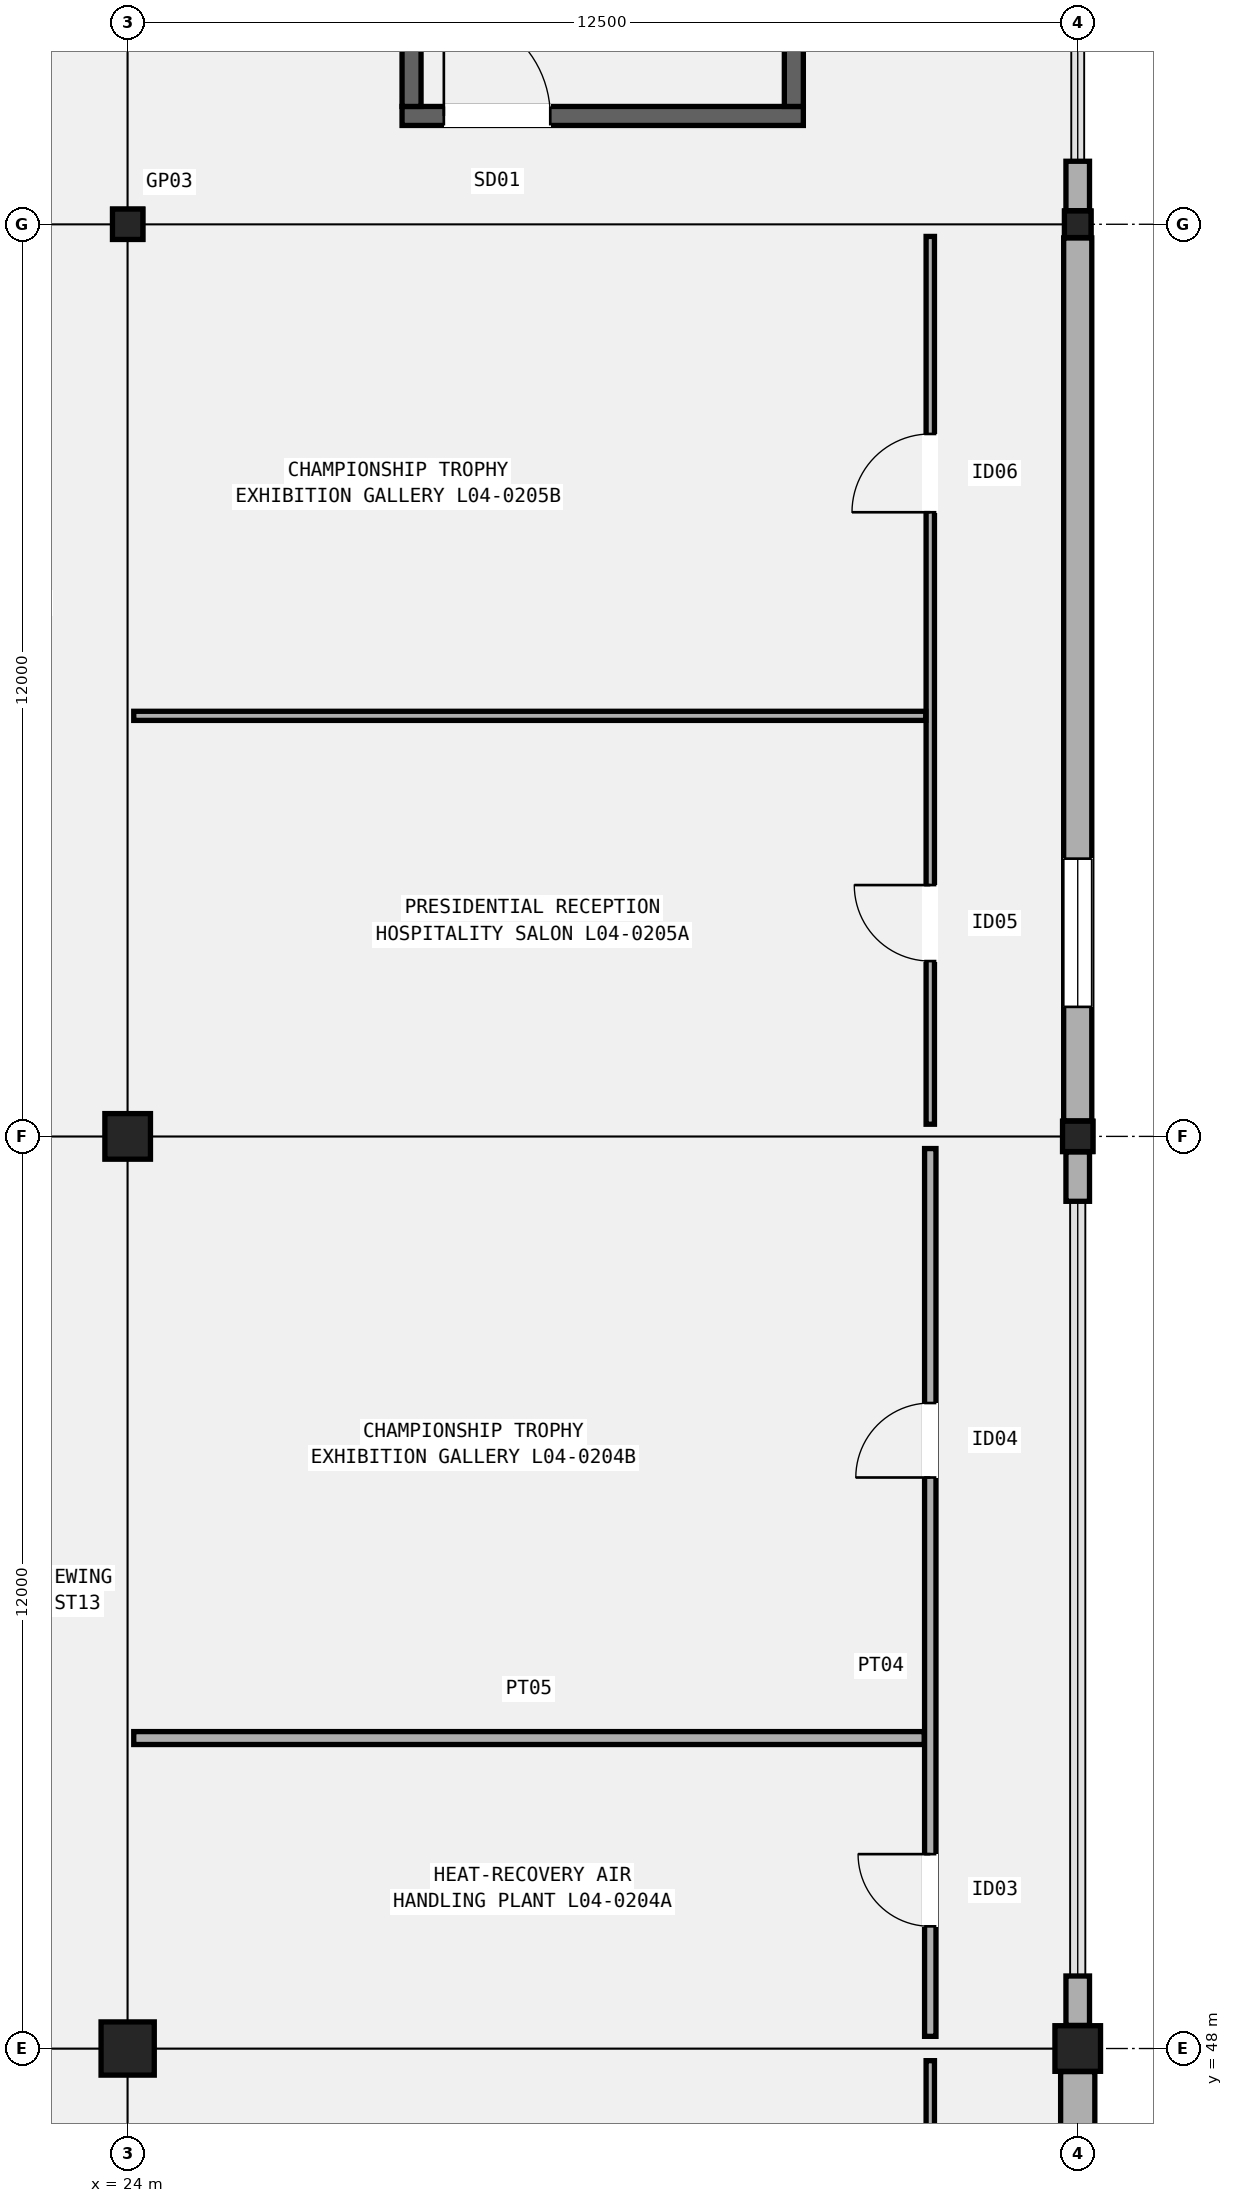
"""IFC4 building model, lengths in metres.
Left out: names, types, materials, properties, quantities, classifications, styles, units other than length and angle.
Written with IfcOpenShell. Run it as: python <this file> out.ifc"""

import sys

from ifc_helpers import new_model, si_unit, direction, frame, frame_2d, origin, origin_2d, place, context, subcontext, project, spatial, rectangle, hollow_rectangle, extrude, element, fill, save


model = new_model("IFC4")
c1 = context("Model", 3, precision=1e-05, world=origin(), true_north=direction((0.0, 1.0)))
c2 = subcontext(c1, "Body", "Model", "MODEL_VIEW")
j1 = project(units=[si_unit("LENGTHUNIT", "METRE"), si_unit("PLANEANGLEUNIT", "RADIAN")], contexts=[c1])
p1 = place(None, origin())
s1 = spatial("IfcSite", under=j1, at=p1, CompositionType="ELEMENT")
p2 = place(p1, origin())
s2 = spatial("IfcBuilding", under=s1, at=p2, CompositionType="ELEMENT")
p3 = place(p2, frame((0.0, 0.0, 20.4)))
s3 = spatial("IfcBuildingStorey", under=s2, at=p3, CompositionType="ELEMENT", Elevation=20.4)
p4 = place(p3, frame((24.0, 48.0, 0.0), z_axis=(0.0, 0.0, 1.0), x_axis=(1.0, 0.0, 0.0)))
e1 = element("IfcColumn", 1, at=p4, inside=s3, PredefinedType="COLUMN", context=c2, shape_type="SweptSolid", body=[
    extrude(rectangle(XDim=0.7, YDim=0.7, at=origin_2d()), origin(), (0.0, 0.0, 1.0), 5.4),
])
p5 = place(p3, frame((24.0, 60.0, 0.0), z_axis=(0.0, 0.0, 1.0), x_axis=(1.0, 0.0, 0.0)))
e2 = element("IfcColumn", 2, at=p5, inside=s3, PredefinedType="COLUMN", context=c2, shape_type="SweptSolid", body=[
    extrude(rectangle(XDim=0.6, YDim=0.6, at=origin_2d()), origin(), (0.0, 0.0, 1.0), 5.4),
])
p6 = place(p3, frame((24.0, 72.0, 0.0), z_axis=(0.0, 0.0, 1.0), x_axis=(1.0, 0.0, 0.0)))
e3 = element("IfcColumn", 3, at=p6, inside=s3, PredefinedType="COLUMN", context=c2, shape_type="SweptSolid", body=[
    extrude(hollow_rectangle(XDim=0.4, YDim=0.4, WallThickness=0.016, InnerFilletRadius=0.016, OuterFilletRadius=0.032, at=origin_2d()), origin(), (0.0, 0.0, 1.0), 5.4),
])
p7 = place(p3, frame((36.5, 48.0, 0.0), z_axis=(0.0, 0.0, 1.0), x_axis=(1.0, 0.0, 0.0)))
e4 = element("IfcColumn", 4, at=p7, inside=s3, PredefinedType="COLUMN", context=c2, shape_type="SweptSolid", body=[
    extrude(rectangle(XDim=0.6, YDim=0.6, at=origin_2d()), origin(), (0.0, 0.0, 1.0), 5.4),
])
p8 = place(p3, frame((36.5, 60.0, 0.0), z_axis=(0.0, 0.0, 1.0), x_axis=(1.0, 0.0, 0.0)))
e5 = element("IfcColumn", 5, at=p8, inside=s3, PredefinedType="COLUMN", context=c2, shape_type="SweptSolid", body=[
    extrude(hollow_rectangle(XDim=0.4, YDim=0.4, WallThickness=0.016, InnerFilletRadius=0.016, OuterFilletRadius=0.032, at=origin_2d()), origin(), (0.0, 0.0, 1.0), 5.4),
])
p9 = place(p3, frame((36.5, 72.0, 0.0), z_axis=(0.0, 0.0, 1.0), x_axis=(1.0, 0.0, 0.0)))
e6 = element("IfcColumn", 6, at=p9, inside=s3, PredefinedType="COLUMN", context=c2, shape_type="SweptSolid", body=[
    extrude(hollow_rectangle(XDim=0.35, YDim=0.35, WallThickness=0.016, InnerFilletRadius=0.016, OuterFilletRadius=0.032, at=origin_2d()), origin(), (0.0, 0.0, 1.0), 5.4),
])
p10 = place(p3, frame((36.5, 36.354, 0.0), z_axis=(0.0, 0.0, 1.0), x_axis=(0.0, 1.0, 0.0)))
e7 = element("IfcWall", 7, at=p10, inside=s3, PredefinedType="SOLIDWALL", context=c2, shape_type="SweptSolid", body=[
    extrude(rectangle(XDim=11.342, YDim=0.45, at=frame_2d((5.671, 0.0))), origin(), (0.0, 0.0, 1.0), 4.48),
])
p11 = place(p10, frame((1.5, 0.0, 0.95)))
e8 = element("IfcOpeningElement", 8, at=p11, cuts=e7, PredefinedType="OPENING", context=c2, shape_type="SweptSolid", body=[
    extrude(rectangle(XDim=1.8, YDim=2.55, at=frame_2d((0.9, 1.275))), frame((0.0, 0.235, 0.0), z_axis=(0.0, -1.0, 0.0), x_axis=(1.0, 0.0, 0.0)), (0.0, 0.0, 1.0), 0.47),
])
p12 = place(p3, frame((36.5, 48.304, 0.0), z_axis=(0.0, 0.0, 1.0), x_axis=(0.0, 1.0, 0.0)))
e9 = element("IfcWall", 9, at=p12, inside=s3, PredefinedType="SOLIDWALL", context=c2, shape_type="SweptSolid", body=[
    extrude(rectangle(XDim=0.65, YDim=0.31, at=frame_2d((0.325, 0.0))), origin(), (0.0, 0.0, 1.0), 4.58),
])
p13 = place(p3, frame((36.5, 59.146, 0.0), z_axis=(0.0, 0.0, 1.0), x_axis=(0.0, 1.0, 0.0)))
e10 = element("IfcWall", 10, at=p13, inside=s3, PredefinedType="SOLIDWALL", context=c2, shape_type="SweptSolid", body=[
    extrude(rectangle(XDim=0.65, YDim=0.31, at=frame_2d((0.325, 0.0))), origin(), (0.0, 0.0, 1.0), 4.58),
])
p14 = place(p3, frame((36.5, 60.204, 0.0), z_axis=(0.0, 0.0, 1.0), x_axis=(0.0, 1.0, 0.0)))
e11 = element("IfcWall", 11, at=p14, inside=s3, PredefinedType="SOLIDWALL", context=c2, shape_type="SweptSolid", body=[
    extrude(rectangle(XDim=11.617, YDim=0.37, at=frame_2d((5.809, 0.0))), origin(), (0.0, 0.0, 1.0), 4.592),
])
p15 = place(p14, frame((1.5, 0.0, 0.95)))
e12 = element("IfcOpeningElement", 12, at=p15, cuts=e11, PredefinedType="OPENING", context=c2, shape_type="SweptSolid", body=[
    extrude(rectangle(XDim=1.95, YDim=1.9, at=frame_2d((0.975, 0.95))), frame((0.0, 0.195, 0.0), z_axis=(0.0, -1.0, 0.0), x_axis=(1.0, 0.0, 0.0)), (0.0, 0.0, 1.0), 0.39),
])
p16 = place(p3, frame((36.5, 72.179, 0.0), z_axis=(0.0, 0.0, 1.0), x_axis=(0.0, 1.0, 0.0)))
e13 = element("IfcWall", 13, at=p16, inside=s3, PredefinedType="SOLIDWALL", context=c2, shape_type="SweptSolid", body=[
    extrude(rectangle(XDim=0.65, YDim=0.31, at=frame_2d((0.325, 0.0))), origin(), (0.0, 0.0, 1.0), 4.48),
])
p17 = place(p3, frame((27.61, 73.425, 0.0), z_axis=(0.0, 0.0, 1.0), x_axis=(1.0, 0.0, 0.0)))
e14 = element("IfcWall", 14, at=p17, inside=s3, PredefinedType="SHEAR", context=c2, shape_type="SweptSolid", body=[
    extrude(rectangle(XDim=5.28, YDim=0.25, at=frame_2d((2.64, 0.0))), origin(), (0.0, 0.0, 1.0), 5.18),
])
p18 = place(p17, frame((0.55, 0.0, 0.0)))
e15 = element("IfcOpeningElement", 15, at=p18, cuts=e14, PredefinedType="OPENING", context=c2, shape_type="SweptSolid", body=[
    extrude(rectangle(XDim=1.4, YDim=2.15, at=frame_2d((0.7, 1.075))), frame((0.0, 0.135, 0.0), z_axis=(0.0, -1.0, 0.0), x_axis=(1.0, 0.0, 0.0)), (0.0, 0.0, 1.0), 0.27),
])
for number, where, z_axis, x_axis in (
    (16, (27.735, 73.55, 0.0), (0.0, 0.0, 1.0), (0.0, 1.0, 0.0)),
    (17, (32.765, 73.55, 0.0), (0.0, 0.0, 1.0), (0.0, 1.0, 0.0)),
):
    element("IfcWall", number, at=place(p3, frame(where, z_axis=z_axis, x_axis=x_axis)), inside=s3, PredefinedType="SHEAR", context=c2, shape_type="SweptSolid", body=[
        extrude(rectangle(XDim=8.9, YDim=0.25, at=frame_2d((4.45, 0.0))), origin(), (0.0, 0.0, 1.0), 5.18),
    ])
p19 = place(p3, frame((34.56, 36.16, 0.0), z_axis=(0.0, 0.0, 1.0), x_axis=(0.0, 1.0, 0.0)))
e18 = element("IfcWall", 18, at=p19, inside=s3, PredefinedType="PARTITIONING", context=c2, shape_type="SweptSolid", body=[
    extrude(rectangle(XDim=11.68, YDim=0.11, at=frame_2d((5.84, 0.0))), origin(), (0.0, 0.0, 1.0), 4.52),
])
p20 = place(p19, frame((2.488, 0.0, 0.0)))
e19 = element("IfcOpeningElement", 19, at=p20, cuts=e18, PredefinedType="OPENING", context=c2, shape_type="SweptSolid", body=[
    extrude(rectangle(XDim=0.9, YDim=2.06, at=frame_2d((0.45, 1.03))), frame((0.0, 0.065, 0.0), z_axis=(0.0, -1.0, 0.0), x_axis=(1.0, 0.0, 0.0)), (0.0, 0.0, 1.0), 0.13),
])
p21 = place(p19, frame((8.398, 0.0, 0.0)))
e20 = element("IfcOpeningElement", 20, at=p21, cuts=e18, PredefinedType="OPENING", context=c2, shape_type="SweptSolid", body=[
    extrude(rectangle(XDim=0.92, YDim=2.1, at=frame_2d((0.46, 1.05))), frame((0.0, 0.065, 0.0), z_axis=(0.0, -1.0, 0.0), x_axis=(1.0, 0.0, 0.0)), (0.0, 0.0, 1.0), 0.13),
])
p22 = place(p3, frame((34.56, 48.16, 0.0), z_axis=(0.0, 0.0, 1.0), x_axis=(0.0, 1.0, 0.0)))
e21 = element("IfcWall", 21, at=p22, inside=s3, PredefinedType="PARTITIONING", context=c2, shape_type="SweptSolid", body=[
    extrude(rectangle(XDim=11.68, YDim=0.15, at=frame_2d((5.84, 0.0))), origin(), (0.0, 0.0, 1.0), 4.52),
])
p23 = place(p22, frame((1.447, 0.0, 0.0)))
e22 = element("IfcOpeningElement", 22, at=p23, cuts=e21, PredefinedType="OPENING", context=c2, shape_type="SweptSolid", body=[
    extrude(rectangle(XDim=0.95, YDim=2.12, at=frame_2d((0.475, 1.06))), frame((0.0, 0.085, 0.0), z_axis=(0.0, -1.0, 0.0), x_axis=(1.0, 0.0, 0.0)), (0.0, 0.0, 1.0), 0.17),
])
p24 = place(p22, frame((7.352, 0.0, 0.0)))
e23 = element("IfcOpeningElement", 23, at=p24, cuts=e21, PredefinedType="OPENING", context=c2, shape_type="SweptSolid", body=[
    extrude(rectangle(XDim=0.98, YDim=2.1, at=frame_2d((0.49, 1.05))), frame((0.0, 0.085, 0.0), z_axis=(0.0, -1.0, 0.0), x_axis=(1.0, 0.0, 0.0)), (0.0, 0.0, 1.0), 0.17),
])
p25 = place(p3, frame((24.08, 52.084, 0.0), z_axis=(0.0, 0.0, 1.0), x_axis=(1.0, 0.0, 0.0)))
e24 = element("IfcWall", 24, at=p25, inside=s3, PredefinedType="PARTITIONING", context=c2, shape_type="SweptSolid", body=[
    extrude(rectangle(XDim=10.4, YDim=0.17, at=frame_2d((5.2, 0.0))), origin(), (0.0, 0.0, 1.0), 4.52),
])
p26 = place(p3, frame((34.56, 60.16, 0.0), z_axis=(0.0, 0.0, 1.0), x_axis=(0.0, 1.0, 0.0)))
e25 = element("IfcWall", 25, at=p26, inside=s3, PredefinedType="PARTITIONING", context=c2, shape_type="SweptSolid", body=[
    extrude(rectangle(XDim=11.68, YDim=0.11, at=frame_2d((5.84, 0.0))), origin(), (0.0, 0.0, 1.0), 4.52),
])
p27 = place(p26, frame((2.146, 0.0, 0.0)))
e26 = element("IfcOpeningElement", 26, at=p27, cuts=e25, PredefinedType="OPENING", context=c2, shape_type="SweptSolid", body=[
    extrude(rectangle(XDim=1.0, YDim=2.14, at=frame_2d((0.5, 1.07))), frame((0.0, 0.065, 0.0), z_axis=(0.0, -1.0, 0.0), x_axis=(1.0, 0.0, 0.0)), (0.0, 0.0, 1.0), 0.13),
])
p28 = place(p26, frame((8.052, 0.0, 0.0)))
e27 = element("IfcOpeningElement", 27, at=p28, cuts=e25, PredefinedType="OPENING", context=c2, shape_type="SweptSolid", body=[
    extrude(rectangle(XDim=1.03, YDim=2.12, at=frame_2d((0.515, 1.06))), frame((0.0, 0.065, 0.0), z_axis=(0.0, -1.0, 0.0), x_axis=(1.0, 0.0, 0.0)), (0.0, 0.0, 1.0), 0.13),
])
p29 = place(p3, frame((24.08, 65.533, 0.0), z_axis=(0.0, 0.0, 1.0), x_axis=(1.0, 0.0, 0.0)))
e28 = element("IfcWall", 28, at=p29, inside=s3, PredefinedType="PARTITIONING", context=c2, shape_type="SweptSolid", body=[
    extrude(rectangle(XDim=10.42, YDim=0.12, at=frame_2d((5.21, 0.0))), origin(), (0.0, 0.0, 1.0), 4.52),
])
p30 = place(p15, origin())
e29 = element("IfcWindow", 29, at=p30, inside=s3, PartitioningType="SINGLE_PANEL", PredefinedType="WINDOW", context=c2, shape_type="SweptSolid", body=[
    extrude(rectangle(XDim=1.95, YDim=1.9, at=frame_2d((0.975, 0.95))), frame((0.0, 0.03, 0.0), z_axis=(0.0, -1.0, 0.0), x_axis=(1.0, 0.0, 0.0)), (0.0, 0.0, 1.0), 0.06),
])
fill(e12, e29)
p31 = place(p18, origin())
e30 = element("IfcDoor", 30, at=p31, inside=s3, OperationType="SINGLE_SWING_LEFT", PredefinedType="DOOR", context=c2, shape_type="SweptSolid", body=[
    extrude(rectangle(XDim=1.4, YDim=2.15, at=frame_2d((0.7, 1.075))), frame((0.0, 0.025, 0.0), z_axis=(0.0, -1.0, 0.0), x_axis=(1.0, 0.0, 0.0)), (0.0, 0.0, 1.0), 0.05),
])
fill(e15, e30)
p32 = place(p23, origin())
e31 = element("IfcDoor", 31, at=p32, inside=s3, OperationType="SINGLE_SWING_RIGHT", PredefinedType="DOOR", context=c2, shape_type="SweptSolid", body=[
    extrude(rectangle(XDim=0.95, YDim=2.12, at=frame_2d((0.475, 1.06))), frame((0.0, 0.025, 0.0), z_axis=(0.0, -1.0, 0.0), x_axis=(1.0, 0.0, 0.0)), (0.0, 0.0, 1.0), 0.05),
])
fill(e22, e31)
p33 = place(p24, origin())
e32 = element("IfcDoor", 32, at=p33, inside=s3, OperationType="SINGLE_SWING_LEFT", PredefinedType="DOOR", context=c2, shape_type="SweptSolid", body=[
    extrude(rectangle(XDim=0.98, YDim=2.1, at=frame_2d((0.49, 1.05))), frame((0.0, 0.025, 0.0), z_axis=(0.0, -1.0, 0.0), x_axis=(1.0, 0.0, 0.0)), (0.0, 0.0, 1.0), 0.05),
])
fill(e23, e32)
p34 = place(p27, origin())
e33 = element("IfcDoor", 33, at=p34, inside=s3, OperationType="SINGLE_SWING_RIGHT", PredefinedType="DOOR", context=c2, shape_type="SweptSolid", body=[
    extrude(rectangle(XDim=1.0, YDim=2.14, at=frame_2d((0.5, 1.07))), frame((0.0, 0.025, 0.0), z_axis=(0.0, -1.0, 0.0), x_axis=(1.0, 0.0, 0.0)), (0.0, 0.0, 1.0), 0.05),
])
fill(e26, e33)
p35 = place(p28, origin())
e34 = element("IfcDoor", 34, at=p35, inside=s3, OperationType="SINGLE_SWING_LEFT", PredefinedType="DOOR", context=c2, shape_type="SweptSolid", body=[
    extrude(rectangle(XDim=1.03, YDim=2.12, at=frame_2d((0.515, 1.06))), frame((0.0, 0.025, 0.0), z_axis=(0.0, -1.0, 0.0), x_axis=(1.0, 0.0, 0.0)), (0.0, 0.0, 1.0), 0.05),
])
fill(e27, e34)
save(model, sys.argv[1])
